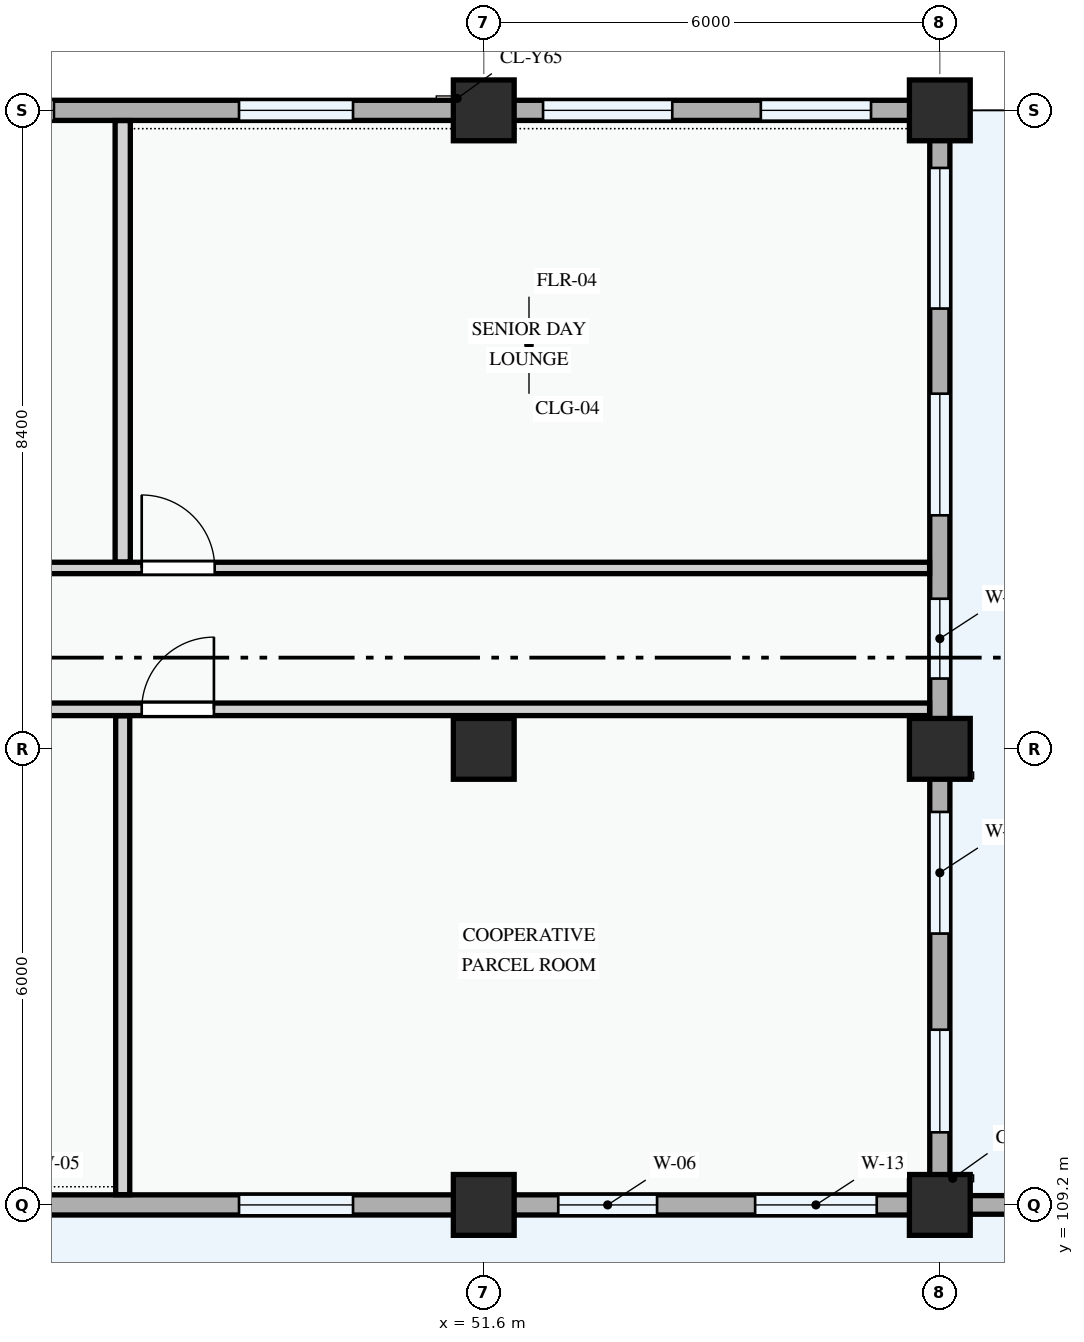
"""IFC4 building model, lengths in metres.
Left out: names, types, materials, properties, quantities, classifications, styles, units other than length and angle.
Written with IfcOpenShell. Run it as: python <this file> out.ifc"""

import sys

from ifc_helpers import new_model, si_unit, direction, frame, frame_2d, origin, origin_2d, place, context, subcontext, project, spatial, rectangle, extrude, element, fill, save


model = new_model("IFC4")
c1 = context("Model", 3, precision=1e-05, world=origin(), true_north=direction((0.0, 1.0)))
c2 = subcontext(c1, "Body", "Model", "MODEL_VIEW")
j1 = project(units=[si_unit("LENGTHUNIT", "METRE"), si_unit("PLANEANGLEUNIT", "RADIAN")], contexts=[c1])
p1 = place(None, origin())
s1 = spatial("IfcSite", under=j1, at=p1, CompositionType="ELEMENT")
p2 = place(p1, origin())
s2 = spatial("IfcBuilding", under=s1, at=p2, CompositionType="ELEMENT")
p3 = place(p2, origin())
s3 = spatial("IfcBuildingStorey", under=s2, at=p3, CompositionType="ELEMENT", Elevation=0.0)
for number, where, z_axis, x_axis in (
    (1, (51.6, 109.2, 0.0), (0.0, 0.0, 1.0), (1.0, 0.0, 0.0)),
    (2, (51.6, 115.2, 0.0), (0.0, 0.0, 1.0), (1.0, 0.0, 0.0)),
    (3, (51.6, 123.6, 0.0), (0.0, 0.0, 1.0), (1.0, 0.0, 0.0)),
    (4, (57.6, 109.2, 0.0), (0.0, 0.0, 1.0), (1.0, 0.0, 0.0)),
    (5, (57.6, 115.2, 0.0), (0.0, 0.0, 1.0), (1.0, 0.0, 0.0)),
    (6, (57.6, 123.6, 0.0), (0.0, 0.0, 1.0), (1.0, 0.0, 0.0)),
):
    element("IfcColumn", number, at=place(p3, frame(where, z_axis=z_axis, x_axis=x_axis)), inside=s3, PredefinedType="COLUMN", context=c2, shape_type="SweptSolid", body=[
        extrude(rectangle(XDim=0.8, YDim=0.8, at=origin_2d()), origin(), (0.0, 0.0, 1.0), 4.5),
    ])
p4 = place(p3, frame((43.2, 109.2, 0.0), z_axis=(0.0, 0.0, 1.0), x_axis=(1.0, 0.0, 0.0)))
e7 = element("IfcWall", 7, at=p4, inside=s3, PredefinedType="STANDARD", context=c2, shape_type="SweptSolid", body=[
    extrude(rectangle(XDim=8.4, YDim=0.265, at=frame_2d((4.2, 0.0))), origin(), (0.0, 0.0, 1.0), 3.485),
])
p5 = place(p4, frame((1.32, 0.0, 0.78)))
e8 = element("IfcOpeningElement", 8, at=p5, cuts=e7, PredefinedType="OPENING", context=c2, shape_type="SweptSolid", body=[
    extrude(rectangle(XDim=1.2, YDim=1.5, at=frame_2d((0.6, 0.75))), frame((0.0, 0.143, 0.0), z_axis=(0.0, -1.0, 0.0), x_axis=(1.0, 0.0, 0.0)), (0.0, 0.0, 1.0), 0.285),
])
p6 = place(p4, frame((5.18, 0.0, 0.78)))
e9 = element("IfcOpeningElement", 9, at=p6, cuts=e7, PredefinedType="OPENING", context=c2, shape_type="SweptSolid", body=[
    extrude(rectangle(XDim=1.5, YDim=1.5, at=frame_2d((0.75, 0.75))), frame((0.0, 0.143, 0.0), z_axis=(0.0, -1.0, 0.0), x_axis=(1.0, 0.0, 0.0)), (0.0, 0.0, 1.0), 0.285),
])
p7 = place(p3, frame((51.6, 109.2, 0.0), z_axis=(0.0, 0.0, 1.0), x_axis=(1.0, 0.0, 0.0)))
e10 = element("IfcWall", 10, at=p7, inside=s3, PredefinedType="STANDARD", context=c2, shape_type="SweptSolid", body=[
    extrude(rectangle(XDim=6.0, YDim=0.265, at=frame_2d((3.0, 0.0))), origin(), (0.0, 0.0, 1.0), 3.585),
])
p8 = place(p7, frame((0.98, 0.0, 0.78)))
e11 = element("IfcOpeningElement", 11, at=p8, cuts=e10, PredefinedType="OPENING", context=c2, shape_type="SweptSolid", body=[
    extrude(rectangle(XDim=1.3, YDim=1.4, at=frame_2d((0.65, 0.7))), frame((0.0, 0.143, 0.0), z_axis=(0.0, -1.0, 0.0), x_axis=(1.0, 0.0, 0.0)), (0.0, 0.0, 1.0), 0.285),
])
p9 = place(p7, frame((3.57, 0.0, 0.78)))
e12 = element("IfcOpeningElement", 12, at=p9, cuts=e10, PredefinedType="OPENING", context=c2, shape_type="SweptSolid", body=[
    extrude(rectangle(XDim=1.6, YDim=1.55, at=frame_2d((0.8, 0.775))), frame((0.0, 0.143, 0.0), z_axis=(0.0, -1.0, 0.0), x_axis=(1.0, 0.0, 0.0)), (0.0, 0.0, 1.0), 0.285),
])
p10 = place(p3, frame((57.6, 109.2, 0.0), z_axis=(0.0, 0.0, 1.0), x_axis=(0.0, 1.0, 0.0)))
e13 = element("IfcWall", 13, at=p10, inside=s3, PredefinedType="STANDARD", context=c2, shape_type="SweptSolid", body=[
    extrude(rectangle(XDim=6.0, YDim=0.265, at=frame_2d((3.0, 0.0))), origin(), (0.0, 0.0, 1.0), 3.585),
])
p11 = place(p10, frame((0.955, 0.0, 0.78)))
e14 = element("IfcOpeningElement", 14, at=p11, cuts=e13, PredefinedType="OPENING", context=c2, shape_type="SweptSolid", body=[
    extrude(rectangle(XDim=1.35, YDim=1.55, at=frame_2d((0.675, 0.775))), frame((0.0, 0.143, 0.0), z_axis=(0.0, -1.0, 0.0), x_axis=(1.0, 0.0, 0.0)), (0.0, 0.0, 1.0), 0.285),
])
p12 = place(p10, frame((3.57, 0.0, 0.78)))
e15 = element("IfcOpeningElement", 15, at=p12, cuts=e13, PredefinedType="OPENING", context=c2, shape_type="SweptSolid", body=[
    extrude(rectangle(XDim=1.6, YDim=1.75, at=frame_2d((0.8, 0.875))), frame((0.0, 0.143, 0.0), z_axis=(0.0, -1.0, 0.0), x_axis=(1.0, 0.0, 0.0)), (0.0, 0.0, 1.0), 0.285),
])
p13 = place(p3, frame((57.6, 115.2, 0.0), z_axis=(0.0, 0.0, 1.0), x_axis=(0.0, 1.0, 0.0)))
e16 = element("IfcWall", 16, at=p13, inside=s3, PredefinedType="STANDARD", context=c2, shape_type="SweptSolid", body=[
    extrude(rectangle(XDim=8.4, YDim=0.265, at=frame_2d((4.2, 0.0))), origin(), (0.0, 0.0, 1.0), 3.485),
])
p14 = place(p13, frame((0.925, 0.0, 0.78)))
e17 = element("IfcOpeningElement", 17, at=p14, cuts=e16, PredefinedType="OPENING", context=c2, shape_type="SweptSolid", body=[
    extrude(rectangle(XDim=1.05, YDim=1.2, at=frame_2d((0.525, 0.6))), frame((0.0, 0.143, 0.0), z_axis=(0.0, -1.0, 0.0), x_axis=(1.0, 0.0, 0.0)), (0.0, 0.0, 1.0), 0.285),
])
p15 = place(p13, frame((3.073, 0.0, 0.78)))
e18 = element("IfcOpeningElement", 18, at=p15, cuts=e16, PredefinedType="OPENING", context=c2, shape_type="SweptSolid", body=[
    extrude(rectangle(XDim=1.6, YDim=1.55, at=frame_2d((0.8, 0.775))), frame((0.0, 0.143, 0.0), z_axis=(0.0, -1.0, 0.0), x_axis=(1.0, 0.0, 0.0)), (0.0, 0.0, 1.0), 0.285),
])
p16 = place(p13, frame((5.792, 0.0, 0.78)))
e19 = element("IfcOpeningElement", 19, at=p16, cuts=e16, PredefinedType="OPENING", context=c2, shape_type="SweptSolid", body=[
    extrude(rectangle(XDim=1.85, YDim=1.6, at=frame_2d((0.925, 0.8))), frame((0.0, 0.143, 0.0), z_axis=(0.0, -1.0, 0.0), x_axis=(1.0, 0.0, 0.0)), (0.0, 0.0, 1.0), 0.285),
])
p17 = place(p3, frame((57.6, 123.6, 0.0), z_axis=(0.0, 0.0, 1.0), x_axis=(-1.0, 0.0, 0.0)))
e20 = element("IfcWall", 20, at=p17, inside=s3, PredefinedType="STANDARD", context=c2, shape_type="SweptSolid", body=[
    extrude(rectangle(XDim=6.0, YDim=0.265, at=frame_2d((3.0, 0.0))), origin(), (0.0, 0.0, 1.0), 3.585),
])
p18 = place(p17, frame((0.905, 0.0, 0.78)))
e21 = element("IfcOpeningElement", 21, at=p18, cuts=e20, PredefinedType="OPENING", context=c2, shape_type="SweptSolid", body=[
    extrude(rectangle(XDim=1.45, YDim=1.6, at=frame_2d((0.725, 0.8))), frame((0.0, 0.143, 0.0), z_axis=(0.0, -1.0, 0.0), x_axis=(1.0, 0.0, 0.0)), (0.0, 0.0, 1.0), 0.285),
])
p19 = place(p17, frame((3.52, 0.0, 0.78)))
e22 = element("IfcOpeningElement", 22, at=p19, cuts=e20, PredefinedType="OPENING", context=c2, shape_type="SweptSolid", body=[
    extrude(rectangle(XDim=1.7, YDim=1.6, at=frame_2d((0.85, 0.8))), frame((0.0, 0.143, 0.0), z_axis=(0.0, -1.0, 0.0), x_axis=(1.0, 0.0, 0.0)), (0.0, 0.0, 1.0), 0.285),
])
p20 = place(p3, frame((51.6, 123.6, 0.0), z_axis=(0.0, 0.0, 1.0), x_axis=(-1.0, 0.0, 0.0)))
e23 = element("IfcWall", 23, at=p20, inside=s3, PredefinedType="STANDARD", context=c2, shape_type="SweptSolid", body=[
    extrude(rectangle(XDim=8.4, YDim=0.265, at=frame_2d((4.2, 0.0))), origin(), (0.0, 0.0, 1.0), 3.485),
])
p21 = place(p20, frame((1.72, 0.0, 0.78)))
e24 = element("IfcOpeningElement", 24, at=p21, cuts=e23, PredefinedType="OPENING", context=c2, shape_type="SweptSolid", body=[
    extrude(rectangle(XDim=1.5, YDim=1.5, at=frame_2d((0.75, 0.75))), frame((0.0, 0.143, 0.0), z_axis=(0.0, -1.0, 0.0), x_axis=(1.0, 0.0, 0.0)), (0.0, 0.0, 1.0), 0.285),
])
p22 = place(p20, frame((5.655, 0.0, 0.78)))
e25 = element("IfcOpeningElement", 25, at=p22, cuts=e23, PredefinedType="OPENING", context=c2, shape_type="SweptSolid", body=[
    extrude(rectangle(XDim=1.65, YDim=1.5, at=frame_2d((0.825, 0.75))), frame((0.0, 0.143, 0.0), z_axis=(0.0, -1.0, 0.0), x_axis=(1.0, 0.0, 0.0)), (0.0, 0.0, 1.0), 0.285),
])
p23 = place(p3, frame((57.6, 109.2, 0.0), z_axis=(0.0, 0.0, 1.0), x_axis=(1.0, 0.0, 0.0)))
e26 = element("IfcWall", 26, at=p23, inside=s3, PredefinedType="STANDARD", context=c2, shape_type="SweptSolid", body=[
    extrude(rectangle(XDim=8.4, YDim=0.245, at=frame_2d((4.2, 0.0))), origin(), (0.0, 0.0, 1.0), 2.35),
])
p24 = place(p23, frame((3.275, 0.0, 0.0)))
e27 = element("IfcOpeningElement", 27, at=p24, cuts=e26, PredefinedType="OPENING", context=c2, shape_type="SweptSolid", body=[
    extrude(rectangle(XDim=1.85, YDim=2.15, at=frame_2d((0.925, 1.075))), frame((0.0, 0.133, 0.0), z_axis=(0.0, -1.0, 0.0), x_axis=(1.0, 0.0, 0.0)), (0.0, 0.0, 1.0), 0.265),
])
p25 = place(p3, frame((46.85, 109.334, 0.0), z_axis=(0.0, 0.0, 1.0), x_axis=(0.0, 1.0, 0.0)))
e28 = element("IfcWall", 28, at=p25, inside=s3, PredefinedType="PARTITIONING", context=c2, shape_type="SweptSolid", body=[
    extrude(rectangle(XDim=6.301, YDim=0.185, at=frame_2d((3.15, 0.0))), origin(), (0.0, 0.0, 1.0), 4.2),
])
p26 = place(p3, frame((46.85, 117.657, 0.0), z_axis=(0.0, 0.0, 1.0), x_axis=(0.0, 1.0, 0.0)))
e29 = element("IfcWall", 29, at=p26, inside=s3, PredefinedType="PARTITIONING", context=c2, shape_type="SweptSolid", body=[
    extrude(rectangle(XDim=5.809, YDim=0.2, at=frame_2d((2.904, 0.0))), origin(), (0.0, 0.0, 1.0), 4.2),
])
p27 = place(p3, frame((25.15, 115.72, 0.0), z_axis=(0.0, 0.0, 1.0), x_axis=(1.0, 0.0, 0.0)))
e30 = element("IfcWall", 30, at=p27, inside=s3, PredefinedType="PARTITIONING", context=c2, shape_type="SweptSolid", body=[
    extrude(rectangle(XDim=32.316, YDim=0.165, at=frame_2d((16.158, 0.0))), origin(), (0.0, 0.0, 1.0), 4.2),
])
p28 = place(p27, frame((7.433, 0.0, 0.0)))
e31 = element("IfcOpeningElement", 31, at=p28, cuts=e30, PredefinedType="OPENING", context=c2, shape_type="SweptSolid", body=[
    extrude(rectangle(XDim=0.95, YDim=2.1, at=frame_2d((0.475, 1.05))), frame((0.0, 0.093, 0.0), z_axis=(0.0, -1.0, 0.0), x_axis=(1.0, 0.0, 0.0)), (0.0, 0.0, 1.0), 0.185),
])
p29 = place(p27, frame((14.586, 0.0, 0.0)))
e32 = element("IfcOpeningElement", 32, at=p29, cuts=e30, PredefinedType="OPENING", context=c2, shape_type="SweptSolid", body=[
    extrude(rectangle(XDim=0.95, YDim=2.1, at=frame_2d((0.475, 1.05))), frame((0.0, 0.093, 0.0), z_axis=(0.0, -1.0, 0.0), x_axis=(1.0, 0.0, 0.0)), (0.0, 0.0, 1.0), 0.185),
])
p30 = place(p27, frame((21.95, 0.0, 0.0)))
e33 = element("IfcOpeningElement", 33, at=p30, cuts=e30, PredefinedType="OPENING", context=c2, shape_type="SweptSolid", body=[
    extrude(rectangle(XDim=0.95, YDim=2.1, at=frame_2d((0.475, 1.05))), frame((0.0, 0.093, 0.0), z_axis=(0.0, -1.0, 0.0), x_axis=(1.0, 0.0, 0.0)), (0.0, 0.0, 1.0), 0.185),
])
p31 = place(p3, frame((22.66, 117.58, 0.0), z_axis=(0.0, 0.0, 1.0), x_axis=(1.0, 0.0, 0.0)))
e34 = element("IfcWall", 34, at=p31, inside=s3, PredefinedType="PARTITIONING", context=c2, shape_type="SweptSolid", body=[
    extrude(rectangle(XDim=34.806, YDim=0.15, at=frame_2d((17.403, 0.0))), origin(), (0.0, 0.0, 1.0), 4.2),
])
p32 = place(p31, frame((9.914, 0.0, 0.0)))
e35 = element("IfcOpeningElement", 35, at=p32, cuts=e34, PredefinedType="OPENING", context=c2, shape_type="SweptSolid", body=[
    extrude(rectangle(XDim=0.92, YDim=2.1, at=frame_2d((0.46, 1.05))), frame((0.0, 0.085, 0.0), z_axis=(0.0, -1.0, 0.0), x_axis=(1.0, 0.0, 0.0)), (0.0, 0.0, 1.0), 0.17),
])
p33 = place(p31, frame((17.072, 0.0, 0.0)))
e36 = element("IfcOpeningElement", 36, at=p33, cuts=e34, PredefinedType="OPENING", context=c2, shape_type="SweptSolid", body=[
    extrude(rectangle(XDim=0.92, YDim=2.1, at=frame_2d((0.46, 1.05))), frame((0.0, 0.085, 0.0), z_axis=(0.0, -1.0, 0.0), x_axis=(1.0, 0.0, 0.0)), (0.0, 0.0, 1.0), 0.17),
])
p34 = place(p31, frame((24.44, 0.0, 0.0)))
e37 = element("IfcOpeningElement", 37, at=p34, cuts=e34, PredefinedType="OPENING", context=c2, shape_type="SweptSolid", body=[
    extrude(rectangle(XDim=0.96, YDim=2.12, at=frame_2d((0.48, 1.06))), frame((0.0, 0.085, 0.0), z_axis=(0.0, -1.0, 0.0), x_axis=(1.0, 0.0, 0.0)), (0.0, 0.0, 1.0), 0.17),
])
p35 = place(p6, origin())
e38 = element("IfcWindow", 38, at=p35, inside=s3, PartitioningType="SINGLE_PANEL", PredefinedType="WINDOW", context=c2, shape_type="SweptSolid", body=[
    extrude(rectangle(XDim=1.5, YDim=1.5, at=frame_2d((0.75, 0.75))), frame((0.0, 0.03, 0.0), z_axis=(0.0, -1.0, 0.0), x_axis=(1.0, 0.0, 0.0)), (0.0, 0.0, 1.0), 0.06),
])
fill(e9, e38)
p36 = place(p8, origin())
e39 = element("IfcWindow", 39, at=p36, inside=s3, PartitioningType="SINGLE_PANEL", PredefinedType="WINDOW", context=c2, shape_type="SweptSolid", body=[
    extrude(rectangle(XDim=1.3, YDim=1.4, at=frame_2d((0.65, 0.7))), frame((0.0, 0.03, 0.0), z_axis=(0.0, -1.0, 0.0), x_axis=(1.0, 0.0, 0.0)), (0.0, 0.0, 1.0), 0.06),
])
fill(e11, e39)
p37 = place(p9, origin())
e40 = element("IfcWindow", 40, at=p37, inside=s3, PartitioningType="DOUBLE_PANEL_VERTICAL", PredefinedType="WINDOW", context=c2, shape_type="SweptSolid", body=[
    extrude(rectangle(XDim=1.6, YDim=1.55, at=frame_2d((0.8, 0.775))), frame((0.0, 0.03, 0.0), z_axis=(0.0, -1.0, 0.0), x_axis=(1.0, 0.0, 0.0)), (0.0, 0.0, 1.0), 0.06),
])
fill(e12, e40)
p38 = place(p11, origin())
e41 = element("IfcWindow", 41, at=p38, inside=s3, PartitioningType="SINGLE_PANEL", PredefinedType="WINDOW", context=c2, shape_type="SweptSolid", body=[
    extrude(rectangle(XDim=1.35, YDim=1.55, at=frame_2d((0.675, 0.775))), frame((0.0, 0.03, 0.0), z_axis=(0.0, -1.0, 0.0), x_axis=(1.0, 0.0, 0.0)), (0.0, 0.0, 1.0), 0.06),
])
fill(e14, e41)
p39 = place(p12, origin())
e42 = element("IfcWindow", 42, at=p39, inside=s3, PartitioningType="DOUBLE_PANEL_VERTICAL", PredefinedType="WINDOW", context=c2, shape_type="SweptSolid", body=[
    extrude(rectangle(XDim=1.6, YDim=1.75, at=frame_2d((0.8, 0.875))), frame((0.0, 0.03, 0.0), z_axis=(0.0, -1.0, 0.0), x_axis=(1.0, 0.0, 0.0)), (0.0, 0.0, 1.0), 0.06),
])
fill(e15, e42)
p40 = place(p14, origin())
e43 = element("IfcWindow", 43, at=p40, inside=s3, PartitioningType="SINGLE_PANEL", PredefinedType="WINDOW", context=c2, shape_type="SweptSolid", body=[
    extrude(rectangle(XDim=1.05, YDim=1.2, at=frame_2d((0.525, 0.6))), frame((0.0, 0.03, 0.0), z_axis=(0.0, -1.0, 0.0), x_axis=(1.0, 0.0, 0.0)), (0.0, 0.0, 1.0), 0.06),
])
fill(e17, e43)
p41 = place(p15, origin())
e44 = element("IfcWindow", 44, at=p41, inside=s3, PartitioningType="DOUBLE_PANEL_VERTICAL", PredefinedType="WINDOW", context=c2, shape_type="SweptSolid", body=[
    extrude(rectangle(XDim=1.6, YDim=1.55, at=frame_2d((0.8, 0.775))), frame((0.0, 0.03, 0.0), z_axis=(0.0, -1.0, 0.0), x_axis=(1.0, 0.0, 0.0)), (0.0, 0.0, 1.0), 0.06),
])
fill(e18, e44)
p42 = place(p16, origin())
e45 = element("IfcWindow", 45, at=p42, inside=s3, PartitioningType="DOUBLE_PANEL_VERTICAL", PredefinedType="WINDOW", context=c2, shape_type="SweptSolid", body=[
    extrude(rectangle(XDim=1.85, YDim=1.6, at=frame_2d((0.925, 0.8))), frame((0.0, 0.03, 0.0), z_axis=(0.0, -1.0, 0.0), x_axis=(1.0, 0.0, 0.0)), (0.0, 0.0, 1.0), 0.06),
])
fill(e19, e45)
p43 = place(p18, origin())
e46 = element("IfcWindow", 46, at=p43, inside=s3, PartitioningType="SINGLE_PANEL", PredefinedType="WINDOW", context=c2, shape_type="SweptSolid", body=[
    extrude(rectangle(XDim=1.45, YDim=1.6, at=frame_2d((0.725, 0.8))), frame((0.0, 0.03, 0.0), z_axis=(0.0, -1.0, 0.0), x_axis=(1.0, 0.0, 0.0)), (0.0, 0.0, 1.0), 0.06),
])
fill(e21, e46)
p44 = place(p19, origin())
e47 = element("IfcWindow", 47, at=p44, inside=s3, PartitioningType="DOUBLE_PANEL_VERTICAL", PredefinedType="WINDOW", context=c2, shape_type="SweptSolid", body=[
    extrude(rectangle(XDim=1.7, YDim=1.6, at=frame_2d((0.85, 0.8))), frame((0.0, 0.03, 0.0), z_axis=(0.0, -1.0, 0.0), x_axis=(1.0, 0.0, 0.0)), (0.0, 0.0, 1.0), 0.06),
])
fill(e22, e47)
p45 = place(p21, origin())
e48 = element("IfcWindow", 48, at=p45, inside=s3, PartitioningType="SINGLE_PANEL", PredefinedType="WINDOW", context=c2, shape_type="SweptSolid", body=[
    extrude(rectangle(XDim=1.5, YDim=1.5, at=frame_2d((0.75, 0.75))), frame((0.0, 0.03, 0.0), z_axis=(0.0, -1.0, 0.0), x_axis=(1.0, 0.0, 0.0)), (0.0, 0.0, 1.0), 0.06),
])
fill(e24, e48)
p46 = place(p22, origin())
e49 = element("IfcWindow", 49, at=p46, inside=s3, PartitioningType="DOUBLE_PANEL_VERTICAL", PredefinedType="WINDOW", context=c2, shape_type="SweptSolid", body=[
    extrude(rectangle(XDim=1.65, YDim=1.5, at=frame_2d((0.825, 0.75))), frame((0.0, 0.03, 0.0), z_axis=(0.0, -1.0, 0.0), x_axis=(1.0, 0.0, 0.0)), (0.0, 0.0, 1.0), 0.06),
])
fill(e25, e49)
p47 = place(p30, origin())
e50 = element("IfcDoor", 50, at=p47, inside=s3, OperationType="SINGLE_SWING_RIGHT", PredefinedType="DOOR", context=c2, shape_type="SweptSolid", body=[
    extrude(rectangle(XDim=0.95, YDim=2.1, at=frame_2d((0.475, 1.05))), frame((0.0, 0.025, 0.0), z_axis=(0.0, -1.0, 0.0), x_axis=(1.0, 0.0, 0.0)), (0.0, 0.0, 1.0), 0.05),
])
fill(e33, e50)
p48 = place(p34, origin())
e51 = element("IfcDoor", 51, at=p48, inside=s3, OperationType="SINGLE_SWING_LEFT", PredefinedType="DOOR", context=c2, shape_type="SweptSolid", body=[
    extrude(rectangle(XDim=0.96, YDim=2.12, at=frame_2d((0.48, 1.06))), frame((0.0, 0.025, 0.0), z_axis=(0.0, -1.0, 0.0), x_axis=(1.0, 0.0, 0.0)), (0.0, 0.0, 1.0), 0.05),
])
fill(e37, e51)
save(model, sys.argv[1])
